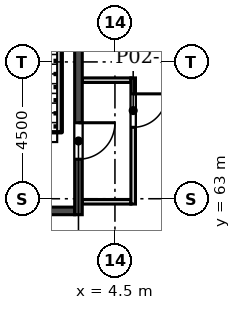
"""IFC4 building model, lengths in metres.
Left out: names, types, materials, properties, quantities, classifications, styles, units other than length and angle.
Written with IfcOpenShell. Run it as: python <this file> out.ifc"""

import sys

from ifc_helpers import new_model, si_unit, direction, frame, frame_2d, origin, place, context, subcontext, project, spatial, rectangle, extrude, element, fill, save


model = new_model("IFC4")
c1 = context("Model", 3, precision=1e-05, world=origin(), true_north=direction((0.0, 1.0)))
c2 = subcontext(c1, "Body", "Model", "MODEL_VIEW")
j1 = project(units=[si_unit("LENGTHUNIT", "METRE"), si_unit("PLANEANGLEUNIT", "RADIAN")], contexts=[c1])
p1 = place(None, origin())
s1 = spatial("IfcSite", under=j1, at=p1, CompositionType="ELEMENT")
p2 = place(p1, origin())
s2 = spatial("IfcBuilding", under=s1, at=p2, CompositionType="ELEMENT")
p3 = place(p2, frame((0.0, 0.0, 14.0)))
s3 = spatial("IfcBuildingStorey", under=s2, at=p3, CompositionType="ELEMENT", Elevation=14.0)
p4 = place(p3, frame((42.853, 8.575, 0.0), z_axis=(0.0, 0.0, 1.0), x_axis=(-0.49999894854, 0.866026010844, 0.0)))
e1 = element("IfcWall", 1, at=p4, inside=s3, PredefinedType="SOLIDWALL", context=c2, shape_type="SweptSolid", body=[
    extrude(rectangle(XDim=76.0, YDim=0.34, at=frame_2d((38.0, 0.0))), origin(), (0.0, 0.0, 1.0), 5.7),
])
p5 = place(p4, frame((1.058, 0.0, 0.9)))
e2 = element("IfcOpeningElement", 2, at=p5, cuts=e1, PredefinedType="OPENING", context=c2, shape_type="SweptSolid", body=[
    extrude(rectangle(XDim=1.885, YDim=3.5, at=frame_2d((0.942, 1.75))), frame((0.0, 0.18, 0.0), z_axis=(0.0, -1.0, 0.0), x_axis=(1.0, 0.0, 0.0)), (0.0, 0.0, 1.0), 0.36),
])
p6 = place(p4, frame((4.058, 0.0, 0.9)))
e3 = element("IfcOpeningElement", 3, at=p6, cuts=e1, PredefinedType="OPENING", context=c2, shape_type="SweptSolid", body=[
    extrude(rectangle(XDim=1.885, YDim=3.5, at=frame_2d((0.942, 1.75))), frame((0.0, 0.18, 0.0), z_axis=(0.0, -1.0, 0.0), x_axis=(1.0, 0.0, 0.0)), (0.0, 0.0, 1.0), 0.36),
])
p7 = place(p4, frame((7.058, 0.0, 0.9)))
e4 = element("IfcOpeningElement", 4, at=p7, cuts=e1, PredefinedType="OPENING", context=c2, shape_type="SweptSolid", body=[
    extrude(rectangle(XDim=1.885, YDim=3.5, at=frame_2d((0.942, 1.75))), frame((0.0, 0.18, 0.0), z_axis=(0.0, -1.0, 0.0), x_axis=(1.0, 0.0, 0.0)), (0.0, 0.0, 1.0), 0.36),
])
p8 = place(p4, frame((10.058, 0.0, 0.9)))
e5 = element("IfcOpeningElement", 5, at=p8, cuts=e1, PredefinedType="OPENING", context=c2, shape_type="SweptSolid", body=[
    extrude(rectangle(XDim=1.885, YDim=3.5, at=frame_2d((0.942, 1.75))), frame((0.0, 0.18, 0.0), z_axis=(0.0, -1.0, 0.0), x_axis=(1.0, 0.0, 0.0)), (0.0, 0.0, 1.0), 0.36),
])
p9 = place(p4, frame((13.058, 0.0, 0.9)))
e6 = element("IfcOpeningElement", 6, at=p9, cuts=e1, PredefinedType="OPENING", context=c2, shape_type="SweptSolid", body=[
    extrude(rectangle(XDim=1.885, YDim=3.5, at=frame_2d((0.942, 1.75))), frame((0.0, 0.18, 0.0), z_axis=(0.0, -1.0, 0.0), x_axis=(1.0, 0.0, 0.0)), (0.0, 0.0, 1.0), 0.36),
])
p10 = place(p4, frame((16.058, 0.0, 0.9)))
e7 = element("IfcOpeningElement", 7, at=p10, cuts=e1, PredefinedType="OPENING", context=c2, shape_type="SweptSolid", body=[
    extrude(rectangle(XDim=1.885, YDim=3.5, at=frame_2d((0.942, 1.75))), frame((0.0, 0.18, 0.0), z_axis=(0.0, -1.0, 0.0), x_axis=(1.0, 0.0, 0.0)), (0.0, 0.0, 1.0), 0.36),
])
p11 = place(p4, frame((19.058, 0.0, 0.9)))
e8 = element("IfcOpeningElement", 8, at=p11, cuts=e1, PredefinedType="OPENING", context=c2, shape_type="SweptSolid", body=[
    extrude(rectangle(XDim=1.885, YDim=3.5, at=frame_2d((0.942, 1.75))), frame((0.0, 0.18, 0.0), z_axis=(0.0, -1.0, 0.0), x_axis=(1.0, 0.0, 0.0)), (0.0, 0.0, 1.0), 0.36),
])
p12 = place(p4, frame((22.058, 0.0, 0.9)))
e9 = element("IfcOpeningElement", 9, at=p12, cuts=e1, PredefinedType="OPENING", context=c2, shape_type="SweptSolid", body=[
    extrude(rectangle(XDim=1.885, YDim=3.5, at=frame_2d((0.942, 1.75))), frame((0.0, 0.18, 0.0), z_axis=(0.0, -1.0, 0.0), x_axis=(1.0, 0.0, 0.0)), (0.0, 0.0, 1.0), 0.36),
])
p13 = place(p4, frame((25.058, 0.0, 0.9)))
e10 = element("IfcOpeningElement", 10, at=p13, cuts=e1, PredefinedType="OPENING", context=c2, shape_type="SweptSolid", body=[
    extrude(rectangle(XDim=1.885, YDim=3.5, at=frame_2d((0.942, 1.75))), frame((0.0, 0.18, 0.0), z_axis=(0.0, -1.0, 0.0), x_axis=(1.0, 0.0, 0.0)), (0.0, 0.0, 1.0), 0.36),
])
p14 = place(p4, frame((28.058, 0.0, 0.9)))
e11 = element("IfcOpeningElement", 11, at=p14, cuts=e1, PredefinedType="OPENING", context=c2, shape_type="SweptSolid", body=[
    extrude(rectangle(XDim=1.885, YDim=3.5, at=frame_2d((0.942, 1.75))), frame((0.0, 0.18, 0.0), z_axis=(0.0, -1.0, 0.0), x_axis=(1.0, 0.0, 0.0)), (0.0, 0.0, 1.0), 0.36),
])
p15 = place(p4, frame((31.058, 0.0, 0.9)))
e12 = element("IfcOpeningElement", 12, at=p15, cuts=e1, PredefinedType="OPENING", context=c2, shape_type="SweptSolid", body=[
    extrude(rectangle(XDim=1.885, YDim=3.5, at=frame_2d((0.942, 1.75))), frame((0.0, 0.18, 0.0), z_axis=(0.0, -1.0, 0.0), x_axis=(1.0, 0.0, 0.0)), (0.0, 0.0, 1.0), 0.36),
])
p16 = place(p4, frame((34.058, 0.0, 0.9)))
e13 = element("IfcOpeningElement", 13, at=p16, cuts=e1, PredefinedType="OPENING", context=c2, shape_type="SweptSolid", body=[
    extrude(rectangle(XDim=1.885, YDim=3.5, at=frame_2d((0.942, 1.75))), frame((0.0, 0.18, 0.0), z_axis=(0.0, -1.0, 0.0), x_axis=(1.0, 0.0, 0.0)), (0.0, 0.0, 1.0), 0.36),
])
p17 = place(p4, frame((37.058, 0.0, 0.9)))
e14 = element("IfcOpeningElement", 14, at=p17, cuts=e1, PredefinedType="OPENING", context=c2, shape_type="SweptSolid", body=[
    extrude(rectangle(XDim=1.885, YDim=3.5, at=frame_2d((0.942, 1.75))), frame((0.0, 0.18, 0.0), z_axis=(0.0, -1.0, 0.0), x_axis=(1.0, 0.0, 0.0)), (0.0, 0.0, 1.0), 0.36),
])
p18 = place(p4, frame((40.058, 0.0, 0.9)))
e15 = element("IfcOpeningElement", 15, at=p18, cuts=e1, PredefinedType="OPENING", context=c2, shape_type="SweptSolid", body=[
    extrude(rectangle(XDim=1.885, YDim=3.5, at=frame_2d((0.942, 1.75))), frame((0.0, 0.18, 0.0), z_axis=(0.0, -1.0, 0.0), x_axis=(1.0, 0.0, 0.0)), (0.0, 0.0, 1.0), 0.36),
])
p19 = place(p4, frame((43.058, 0.0, 0.9)))
e16 = element("IfcOpeningElement", 16, at=p19, cuts=e1, PredefinedType="OPENING", context=c2, shape_type="SweptSolid", body=[
    extrude(rectangle(XDim=1.885, YDim=3.5, at=frame_2d((0.942, 1.75))), frame((0.0, 0.18, 0.0), z_axis=(0.0, -1.0, 0.0), x_axis=(1.0, 0.0, 0.0)), (0.0, 0.0, 1.0), 0.36),
])
p20 = place(p4, frame((46.058, 0.0, 0.9)))
e17 = element("IfcOpeningElement", 17, at=p20, cuts=e1, PredefinedType="OPENING", context=c2, shape_type="SweptSolid", body=[
    extrude(rectangle(XDim=1.885, YDim=3.5, at=frame_2d((0.942, 1.75))), frame((0.0, 0.18, 0.0), z_axis=(0.0, -1.0, 0.0), x_axis=(1.0, 0.0, 0.0)), (0.0, 0.0, 1.0), 0.36),
])
p21 = place(p4, frame((49.058, 0.0, 0.9)))
e18 = element("IfcOpeningElement", 18, at=p21, cuts=e1, PredefinedType="OPENING", context=c2, shape_type="SweptSolid", body=[
    extrude(rectangle(XDim=1.885, YDim=3.5, at=frame_2d((0.942, 1.75))), frame((0.0, 0.18, 0.0), z_axis=(0.0, -1.0, 0.0), x_axis=(1.0, 0.0, 0.0)), (0.0, 0.0, 1.0), 0.36),
])
p22 = place(p4, frame((52.058, 0.0, 0.9)))
e19 = element("IfcOpeningElement", 19, at=p22, cuts=e1, PredefinedType="OPENING", context=c2, shape_type="SweptSolid", body=[
    extrude(rectangle(XDim=1.885, YDim=3.5, at=frame_2d((0.942, 1.75))), frame((0.0, 0.18, 0.0), z_axis=(0.0, -1.0, 0.0), x_axis=(1.0, 0.0, 0.0)), (0.0, 0.0, 1.0), 0.36),
])
p23 = place(p4, frame((55.058, 0.0, 0.9)))
e20 = element("IfcOpeningElement", 20, at=p23, cuts=e1, PredefinedType="OPENING", context=c2, shape_type="SweptSolid", body=[
    extrude(rectangle(XDim=1.885, YDim=3.5, at=frame_2d((0.942, 1.75))), frame((0.0, 0.18, 0.0), z_axis=(0.0, -1.0, 0.0), x_axis=(1.0, 0.0, 0.0)), (0.0, 0.0, 1.0), 0.36),
])
p24 = place(p4, frame((58.058, 0.0, 0.9)))
e21 = element("IfcOpeningElement", 21, at=p24, cuts=e1, PredefinedType="OPENING", context=c2, shape_type="SweptSolid", body=[
    extrude(rectangle(XDim=1.885, YDim=3.5, at=frame_2d((0.942, 1.75))), frame((0.0, 0.18, 0.0), z_axis=(0.0, -1.0, 0.0), x_axis=(1.0, 0.0, 0.0)), (0.0, 0.0, 1.0), 0.36),
])
p25 = place(p4, frame((61.058, 0.0, 0.9)))
e22 = element("IfcOpeningElement", 22, at=p25, cuts=e1, PredefinedType="OPENING", context=c2, shape_type="SweptSolid", body=[
    extrude(rectangle(XDim=1.885, YDim=3.5, at=frame_2d((0.942, 1.75))), frame((0.0, 0.18, 0.0), z_axis=(0.0, -1.0, 0.0), x_axis=(1.0, 0.0, 0.0)), (0.0, 0.0, 1.0), 0.36),
])
p26 = place(p4, frame((64.058, 0.0, 0.9)))
e23 = element("IfcOpeningElement", 23, at=p26, cuts=e1, PredefinedType="OPENING", context=c2, shape_type="SweptSolid", body=[
    extrude(rectangle(XDim=1.885, YDim=3.5, at=frame_2d((0.942, 1.75))), frame((0.0, 0.18, 0.0), z_axis=(0.0, -1.0, 0.0), x_axis=(1.0, 0.0, 0.0)), (0.0, 0.0, 1.0), 0.36),
])
p27 = place(p4, frame((67.058, 0.0, 0.9)))
e24 = element("IfcOpeningElement", 24, at=p27, cuts=e1, PredefinedType="OPENING", context=c2, shape_type="SweptSolid", body=[
    extrude(rectangle(XDim=1.885, YDim=3.5, at=frame_2d((0.942, 1.75))), frame((0.0, 0.18, 0.0), z_axis=(0.0, -1.0, 0.0), x_axis=(1.0, 0.0, 0.0)), (0.0, 0.0, 1.0), 0.36),
])
p28 = place(p4, frame((70.058, 0.0, 0.9)))
e25 = element("IfcOpeningElement", 25, at=p28, cuts=e1, PredefinedType="OPENING", context=c2, shape_type="SweptSolid", body=[
    extrude(rectangle(XDim=1.885, YDim=3.5, at=frame_2d((0.942, 1.75))), frame((0.0, 0.18, 0.0), z_axis=(0.0, -1.0, 0.0), x_axis=(1.0, 0.0, 0.0)), (0.0, 0.0, 1.0), 0.36),
])
p29 = place(p4, frame((73.058, 0.0, 0.9)))
e26 = element("IfcOpeningElement", 26, at=p29, cuts=e1, PredefinedType="OPENING", context=c2, shape_type="SweptSolid", body=[
    extrude(rectangle(XDim=1.885, YDim=3.5, at=frame_2d((0.942, 1.75))), frame((0.0, 0.18, 0.0), z_axis=(0.0, -1.0, 0.0), x_axis=(1.0, 0.0, 0.0)), (0.0, 0.0, 1.0), 0.36),
])
p30 = place(p3, frame((3.175, 62.6, 0.0), z_axis=(0.0, 0.0, 1.0), x_axis=(-1.0, 0.0, 0.0)))
e27 = element("IfcWall", 27, at=p30, inside=s3, PredefinedType="SOLIDWALL", context=c2, shape_type="SweptSolid", body=[
    extrude(rectangle(XDim=6.35, YDim=0.25, at=frame_2d((3.175, 0.0))), origin(), (0.0, 0.0, 1.0), 5.7),
])
for number, where, z_axis, x_axis in (
    (28, (5.025, 62.9, 0.0), (0.0, 0.0, 1.0), (-1.0, 0.0, 0.0)),
    (29, (3.425, 66.9, 0.0), (0.0, 0.0, 1.0), (1.0, 0.0, 0.0)),
):
    element("IfcWall", number, at=place(p3, frame(where, z_axis=z_axis, x_axis=x_axis)), inside=s3, PredefinedType="PARTITIONING", context=c2, shape_type="SweptSolid", body=[
        extrude(rectangle(XDim=1.6, YDim=0.15, at=frame_2d((0.8, 0.0))), origin(), (0.0, 0.0, 1.0), 5.7),
    ])
p31 = place(p3, frame((5.1, 66.975, 0.0), z_axis=(0.0, 0.0, 1.0), x_axis=(0.0, -1.0, 0.0)))
e30 = element("IfcWall", 30, at=p31, inside=s3, PredefinedType="PARTITIONING", context=c2, shape_type="SweptSolid", body=[
    extrude(rectangle(XDim=4.15, YDim=0.15, at=frame_2d((2.075, 0.0))), origin(), (0.0, 0.0, 1.0), 5.7),
])
p32 = place(p31, frame((0.525, 0.0, 0.0)))
e31 = element("IfcOpeningElement", 31, at=p32, cuts=e30, PredefinedType="OPENING", context=c2, shape_type="SweptSolid", body=[
    extrude(rectangle(XDim=1.1, YDim=2.1, at=frame_2d((0.55, 1.05))), frame((0.0, 0.085, 0.0), z_axis=(0.0, -1.0, 0.0), x_axis=(1.0, 0.0, 0.0)), (0.0, 0.0, 1.0), 0.17),
])
p33 = place(p3, frame((3.3, 74.233, 0.0), z_axis=(0.0, 0.0, 1.0), x_axis=(0.0, -1.0, 0.0)))
e32 = element("IfcWall", 32, at=p33, inside=s3, PredefinedType="SOLIDWALL", context=c2, shape_type="SweptSolid", body=[
    extrude(rectangle(XDim=11.758, YDim=0.25, at=frame_2d((5.879, 0.0))), origin(), (0.0, 0.0, 1.0), 5.7),
])
p34 = place(p33, frame((8.733, 0.0, 0.0)))
e33 = element("IfcOpeningElement", 33, at=p34, cuts=e32, PredefinedType="OPENING", context=c2, shape_type="SweptSolid", body=[
    extrude(rectangle(XDim=1.2, YDim=2.1, at=frame_2d((0.6, 1.05))), frame((0.0, 0.135, 0.0), z_axis=(0.0, -1.0, 0.0), x_axis=(1.0, 0.0, 0.0)), (0.0, 0.0, 1.0), 0.27),
])
p35 = place(p34, origin())
e34 = element("IfcDoor", 34, at=p35, inside=s3, OperationType="SINGLE_SWING_LEFT", PredefinedType="DOOR", context=c2, shape_type="SweptSolid", body=[
    extrude(rectangle(XDim=1.2, YDim=2.1, at=frame_2d((0.6, 1.05))), frame((0.0, 0.025, 0.0), z_axis=(0.0, -1.0, 0.0), x_axis=(1.0, 0.0, 0.0)), (0.0, 0.0, 1.0), 0.05),
])
fill(e33, e34)
p36 = place(p32, origin())
e35 = element("IfcDoor", 35, at=p36, inside=s3, OperationType="SINGLE_SWING_LEFT", PredefinedType="DOOR", context=c2, shape_type="SweptSolid", body=[
    extrude(rectangle(XDim=1.1, YDim=2.1, at=frame_2d((0.55, 1.05))), frame((0.0, 0.025, 0.0), z_axis=(0.0, -1.0, 0.0), x_axis=(1.0, 0.0, 0.0)), (0.0, 0.0, 1.0), 0.05),
])
fill(e31, e35)
save(model, sys.argv[1])
